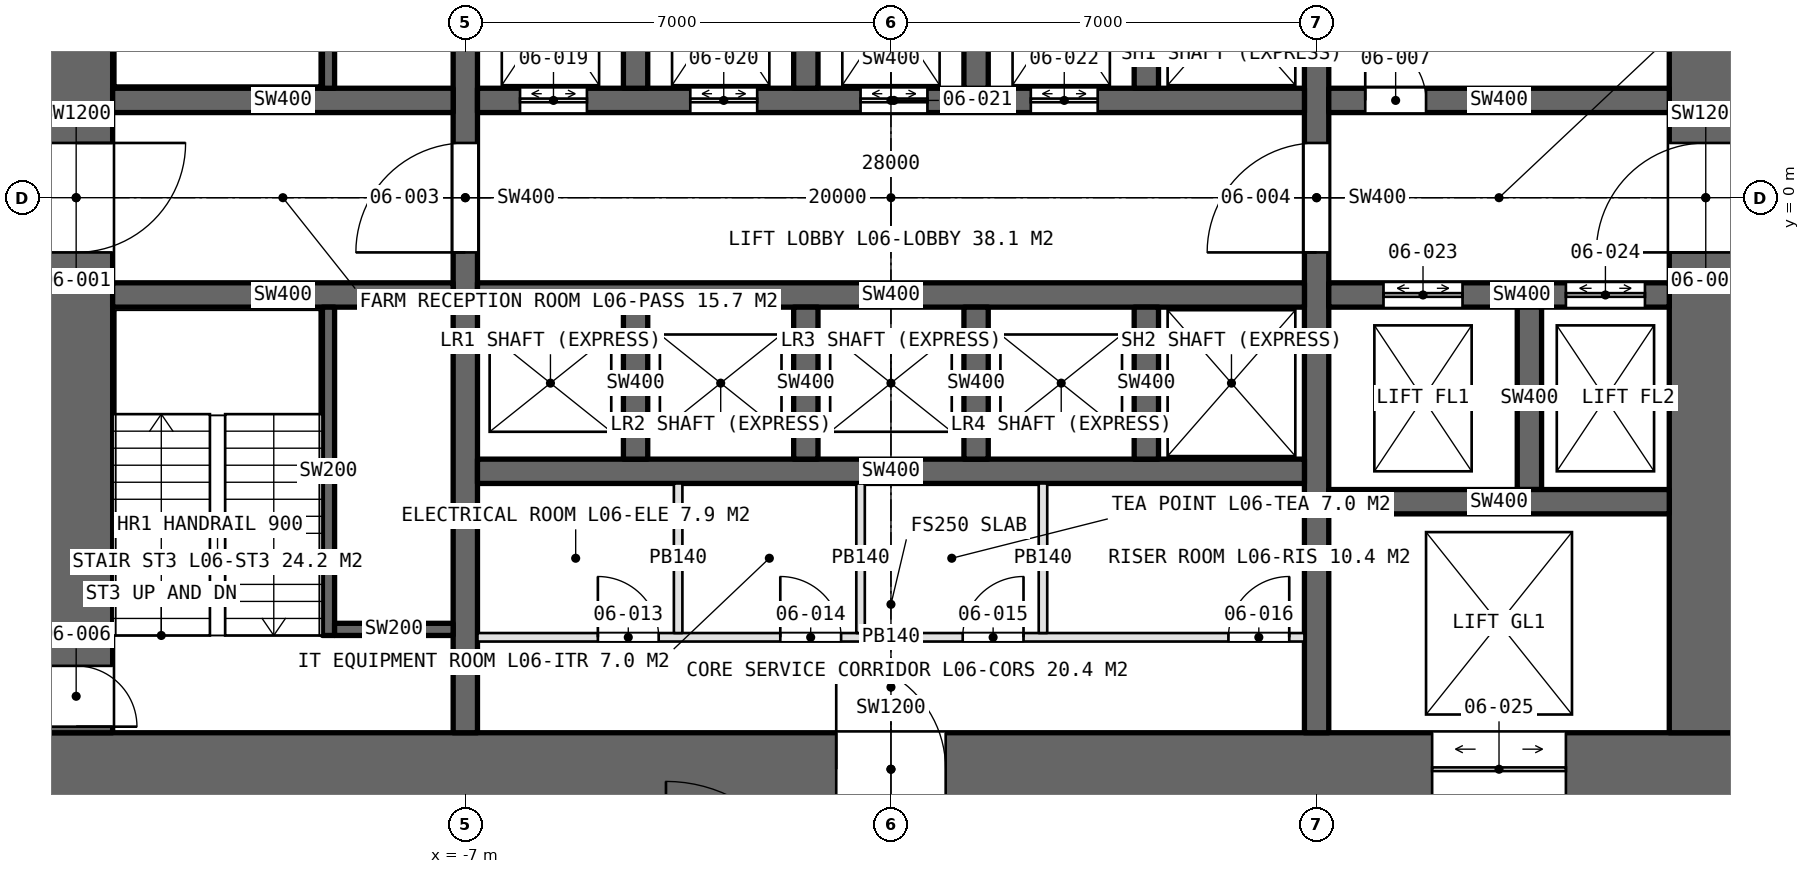
"""IFC4 building model, lengths in metres.
Left out: names, types, materials, properties, quantities, classifications, styles, units other than length and angle.
Written with IfcOpenShell. Run it as: python <this file> out.ifc"""

import sys

from ifc_helpers import new_model, si_unit, direction, frame, frame_2d, origin, place, context, subcontext, project, spatial, rectangle, extrude, element, fill, save


model = new_model("IFC4")
c1 = context("Model", 3, precision=1e-05, world=origin(), true_north=direction((0.0, 1.0)))
c2 = subcontext(c1, "Body", "Model", "MODEL_VIEW")
j1 = project(units=[si_unit("LENGTHUNIT", "METRE"), si_unit("PLANEANGLEUNIT", "RADIAN")], contexts=[c1])
p1 = place(None, origin())
s1 = spatial("IfcSite", under=j1, at=p1, CompositionType="ELEMENT")
p2 = place(p1, origin())
s2 = spatial("IfcBuilding", under=s1, at=p2, CompositionType="ELEMENT")
p3 = place(p2, frame((0.0, 0.0, 30.0)))
s3 = spatial("IfcBuildingStorey", under=s2, at=p3, CompositionType="ELEMENT", Elevation=30.0)
p4 = place(p3, frame((-14.0, -9.4, 0.0), z_axis=(0.0, 0.0, 1.0), x_axis=(1.0, 0.0, 0.0)))
e1 = element("IfcWall", 1, at=p4, inside=s3, PredefinedType="SHEAR", context=c2, shape_type="SweptSolid", body=[
    extrude(rectangle(XDim=28.0, YDim=1.2, at=frame_2d((14.0, 0.0))), origin(), (0.0, 0.0, 1.0), 5.0),
])
p5 = place(p4, frame((13.1, 0.0, 0.0)))
e2 = element("IfcOpeningElement", 2, at=p5, cuts=e1, PredefinedType="OPENING", context=c2, shape_type="SweptSolid", body=[
    extrude(rectangle(XDim=1.8, YDim=2.4, at=frame_2d((0.9, 1.2))), frame((0.0, 0.61, 0.0), z_axis=(0.0, -1.0, 0.0), x_axis=(1.0, 0.0, 0.0)), (0.0, 0.0, 1.0), 1.22),
])
p6 = place(p4, frame((22.9, 0.0, 0.0)))
e3 = element("IfcOpeningElement", 3, at=p6, cuts=e1, PredefinedType="OPENING", context=c2, shape_type="SweptSolid", body=[
    extrude(rectangle(XDim=2.2, YDim=2.7, at=frame_2d((1.1, 1.35))), frame((0.0, 0.61, 0.0), z_axis=(0.0, -1.0, 0.0), x_axis=(1.0, 0.0, 0.0)), (0.0, 0.0, 1.0), 1.22),
])
p7 = place(p3, frame((-13.4, 8.8, 0.0), z_axis=(0.0, 0.0, 1.0), x_axis=(0.0, -1.0, 0.0)))
e4 = element("IfcWall", 4, at=p7, inside=s3, PredefinedType="SHEAR", context=c2, shape_type="SweptSolid", body=[
    extrude(rectangle(XDim=17.6, YDim=1.2, at=frame_2d((8.8, 0.0))), origin(), (0.0, 0.0, 1.0), 5.0),
])
p8 = place(p7, frame((7.9, 0.0, 0.0)))
e5 = element("IfcOpeningElement", 5, at=p8, cuts=e4, PredefinedType="OPENING", context=c2, shape_type="SweptSolid", body=[
    extrude(rectangle(XDim=1.8, YDim=2.4, at=frame_2d((0.9, 1.2))), frame((0.0, 0.61, 0.0), z_axis=(0.0, -1.0, 0.0), x_axis=(1.0, 0.0, 0.0)), (0.0, 0.0, 1.0), 1.22),
])
p9 = place(p7, frame((16.5, 0.0, 0.0)))
e6 = element("IfcOpeningElement", 6, at=p9, cuts=e4, PredefinedType="OPENING", context=c2, shape_type="SweptSolid", body=[
    extrude(rectangle(XDim=1.0, YDim=2.4, at=frame_2d((0.5, 1.2))), frame((0.0, 0.61, 0.0), z_axis=(0.0, -1.0, 0.0), x_axis=(1.0, 0.0, 0.0)), (0.0, 0.0, 1.0), 1.22),
])
p10 = place(p3, frame((13.4, -8.8, 0.0), z_axis=(0.0, 0.0, 1.0), x_axis=(0.0, 1.0, 0.0)))
e7 = element("IfcWall", 7, at=p10, inside=s3, PredefinedType="SHEAR", context=c2, shape_type="SweptSolid", body=[
    extrude(rectangle(XDim=17.6, YDim=1.2, at=frame_2d((8.8, 0.0))), origin(), (0.0, 0.0, 1.0), 5.0),
])
p11 = place(p10, frame((7.9, 0.0, 0.0)))
e8 = element("IfcOpeningElement", 8, at=p11, cuts=e7, PredefinedType="OPENING", context=c2, shape_type="SweptSolid", body=[
    extrude(rectangle(XDim=1.8, YDim=2.4, at=frame_2d((0.9, 1.2))), frame((0.0, 0.61, 0.0), z_axis=(0.0, -1.0, 0.0), x_axis=(1.0, 0.0, 0.0)), (0.0, 0.0, 1.0), 1.22),
])
p12 = place(p3, frame((-7.0, -8.8, 0.0), z_axis=(0.0, 0.0, 1.0), x_axis=(0.0, 1.0, 0.0)))
e9 = element("IfcWall", 9, at=p12, inside=s3, PredefinedType="SHEAR", context=c2, shape_type="SweptSolid", body=[
    extrude(rectangle(XDim=17.6, YDim=0.4, at=frame_2d((8.8, 0.0))), origin(), (0.0, 0.0, 1.0), 5.0),
])
p13 = place(p12, frame((7.9, 0.0, 0.0)))
e10 = element("IfcOpeningElement", 10, at=p13, cuts=e9, PredefinedType="OPENING", context=c2, shape_type="SweptSolid", body=[
    extrude(rectangle(XDim=1.8, YDim=2.4, at=frame_2d((0.9, 1.2))), frame((0.0, 0.21, 0.0), z_axis=(0.0, -1.0, 0.0), x_axis=(1.0, 0.0, 0.0)), (0.0, 0.0, 1.0), 0.42),
])
p14 = place(p3, frame((7.0, -8.8, 0.0), z_axis=(0.0, 0.0, 1.0), x_axis=(0.0, 1.0, 0.0)))
e11 = element("IfcWall", 11, at=p14, inside=s3, PredefinedType="SHEAR", context=c2, shape_type="SweptSolid", body=[
    extrude(rectangle(XDim=17.6, YDim=0.4, at=frame_2d((8.8, 0.0))), origin(), (0.0, 0.0, 1.0), 5.0),
])
p15 = place(p14, frame((7.9, 0.0, 0.0)))
e12 = element("IfcOpeningElement", 12, at=p15, cuts=e11, PredefinedType="OPENING", context=c2, shape_type="SweptSolid", body=[
    extrude(rectangle(XDim=1.8, YDim=2.4, at=frame_2d((0.9, 1.2))), frame((0.0, 0.21, 0.0), z_axis=(0.0, -1.0, 0.0), x_axis=(1.0, 0.0, 0.0)), (0.0, 0.0, 1.0), 0.42),
])
p16 = place(p3, frame((-6.8, 1.6, 0.0), z_axis=(0.0, 0.0, 1.0), x_axis=(1.0, 0.0, 0.0)))
e13 = element("IfcWall", 13, at=p16, inside=s3, PredefinedType="SHEAR", context=c2, shape_type="SweptSolid", body=[
    extrude(rectangle(XDim=13.6, YDim=0.4, at=frame_2d((6.8, 0.0))), origin(), (0.0, 0.0, 1.0), 5.0),
])
p17 = place(p16, frame((0.7, 0.0, 0.0)))
e14 = element("IfcOpeningElement", 14, at=p17, cuts=e13, PredefinedType="OPENING", context=c2, shape_type="SweptSolid", body=[
    extrude(rectangle(XDim=1.1, YDim=2.4, at=frame_2d((0.55, 1.2))), frame((0.0, 0.21, 0.0), z_axis=(0.0, -1.0, 0.0), x_axis=(1.0, 0.0, 0.0)), (0.0, 0.0, 1.0), 0.42),
])
p18 = place(p16, frame((3.5, 0.0, 0.0)))
e15 = element("IfcOpeningElement", 15, at=p18, cuts=e13, PredefinedType="OPENING", context=c2, shape_type="SweptSolid", body=[
    extrude(rectangle(XDim=1.1, YDim=2.4, at=frame_2d((0.55, 1.2))), frame((0.0, 0.21, 0.0), z_axis=(0.0, -1.0, 0.0), x_axis=(1.0, 0.0, 0.0)), (0.0, 0.0, 1.0), 0.42),
])
p19 = place(p16, frame((6.3, 0.0, 0.0)))
e16 = element("IfcOpeningElement", 16, at=p19, cuts=e13, PredefinedType="OPENING", context=c2, shape_type="SweptSolid", body=[
    extrude(rectangle(XDim=1.1, YDim=2.4, at=frame_2d((0.55, 1.2))), frame((0.0, 0.21, 0.0), z_axis=(0.0, -1.0, 0.0), x_axis=(1.0, 0.0, 0.0)), (0.0, 0.0, 1.0), 0.42),
])
p20 = place(p16, frame((9.1, 0.0, 0.0)))
e17 = element("IfcOpeningElement", 17, at=p20, cuts=e13, PredefinedType="OPENING", context=c2, shape_type="SweptSolid", body=[
    extrude(rectangle(XDim=1.1, YDim=2.4, at=frame_2d((0.55, 1.2))), frame((0.0, 0.21, 0.0), z_axis=(0.0, -1.0, 0.0), x_axis=(1.0, 0.0, 0.0)), (0.0, 0.0, 1.0), 0.42),
])
for number, where, z_axis, x_axis in (
    (18, (-6.8, -1.6, 0.0), (0.0, 0.0, 1.0), (1.0, 0.0, 0.0)),
    (19, (-6.8, -4.5, 0.0), (0.0, 0.0, 1.0), (1.0, 0.0, 0.0)),
):
    element("IfcWall", number, at=place(p3, frame(where, z_axis=z_axis, x_axis=x_axis)), inside=s3, PredefinedType="SHEAR", context=c2, shape_type="SweptSolid", body=[
        extrude(rectangle(XDim=13.6, YDim=0.4, at=frame_2d((6.8, 0.0))), origin(), (0.0, 0.0, 1.0), 5.0),
    ])
for number, where, z_axis, x_axis in (
    (20, (-12.8, 1.6, 0.0), (0.0, 0.0, 1.0), (1.0, 0.0, 0.0)),
    (21, (-12.8, -1.6, 0.0), (0.0, 0.0, 1.0), (1.0, 0.0, 0.0)),
):
    element("IfcWall", number, at=place(p3, frame(where, z_axis=z_axis, x_axis=x_axis)), inside=s3, PredefinedType="SHEAR", context=c2, shape_type="SweptSolid", body=[
        extrude(rectangle(XDim=5.6, YDim=0.4, at=frame_2d((2.8, 0.0))), origin(), (0.0, 0.0, 1.0), 5.0),
    ])
p21 = place(p3, frame((7.2, 1.6, 0.0), z_axis=(0.0, 0.0, 1.0), x_axis=(1.0, 0.0, 0.0)))
e22 = element("IfcWall", 22, at=p21, inside=s3, PredefinedType="SHEAR", context=c2, shape_type="SweptSolid", body=[
    extrude(rectangle(XDim=5.6, YDim=0.4, at=frame_2d((2.8, 0.0))), origin(), (0.0, 0.0, 1.0), 5.0),
])
p22 = place(p21, frame((0.6, 0.0, 0.0)))
e23 = element("IfcOpeningElement", 23, at=p22, cuts=e22, PredefinedType="OPENING", context=c2, shape_type="SweptSolid", body=[
    extrude(rectangle(XDim=1.0, YDim=2.4, at=frame_2d((0.5, 1.2))), frame((0.0, 0.21, 0.0), z_axis=(0.0, -1.0, 0.0), x_axis=(1.0, 0.0, 0.0)), (0.0, 0.0, 1.0), 0.42),
])
p23 = place(p3, frame((7.2, -1.6, 0.0), z_axis=(0.0, 0.0, 1.0), x_axis=(1.0, 0.0, 0.0)))
e24 = element("IfcWall", 24, at=p23, inside=s3, PredefinedType="SHEAR", context=c2, shape_type="SweptSolid", body=[
    extrude(rectangle(XDim=5.6, YDim=0.4, at=frame_2d((2.8, 0.0))), origin(), (0.0, 0.0, 1.0), 5.0),
])
p24 = place(p23, frame((0.9, 0.0, 0.0)))
e25 = element("IfcOpeningElement", 25, at=p24, cuts=e24, PredefinedType="OPENING", context=c2, shape_type="SweptSolid", body=[
    extrude(rectangle(XDim=1.3, YDim=2.4, at=frame_2d((0.65, 1.2))), frame((0.0, 0.21, 0.0), z_axis=(0.0, -1.0, 0.0), x_axis=(1.0, 0.0, 0.0)), (0.0, 0.0, 1.0), 0.42),
])
p25 = place(p23, frame((3.9, 0.0, 0.0)))
e26 = element("IfcOpeningElement", 26, at=p25, cuts=e24, PredefinedType="OPENING", context=c2, shape_type="SweptSolid", body=[
    extrude(rectangle(XDim=1.3, YDim=2.4, at=frame_2d((0.65, 1.2))), frame((0.0, 0.21, 0.0), z_axis=(0.0, -1.0, 0.0), x_axis=(1.0, 0.0, 0.0)), (0.0, 0.0, 1.0), 0.42),
])
p26 = place(p3, frame((10.5, -4.8, 0.0), z_axis=(0.0, 0.0, 1.0), x_axis=(0.0, 1.0, 0.0)))
e27 = element("IfcWall", 27, at=p26, inside=s3, PredefinedType="SHEAR", context=c2, shape_type="SweptSolid", body=[
    extrude(rectangle(XDim=3.0, YDim=0.4, at=frame_2d((1.5, 0.0))), origin(), (0.0, 0.0, 1.0), 5.0),
])
p27 = place(p3, frame((7.2, -5.0, 0.0), z_axis=(0.0, 0.0, 1.0), x_axis=(1.0, 0.0, 0.0)))
e28 = element("IfcWall", 28, at=p27, inside=s3, PredefinedType="SHEAR", context=c2, shape_type="SweptSolid", body=[
    extrude(rectangle(XDim=5.6, YDim=0.4, at=frame_2d((2.8, 0.0))), origin(), (0.0, 0.0, 1.0), 5.0),
])
for number, where, z_axis, x_axis in (
    (29, (-4.2, 1.8, 0.0), (0.0, 0.0, 1.0), (0.0, 1.0, 0.0)),
    (30, (-4.2, -4.3, 0.0), (0.0, 0.0, 1.0), (0.0, 1.0, 0.0)),
    (31, (-1.4, 1.8, 0.0), (0.0, 0.0, 1.0), (0.0, 1.0, 0.0)),
    (32, (-1.4, -4.3, 0.0), (0.0, 0.0, 1.0), (0.0, 1.0, 0.0)),
    (33, (1.4, 1.8, 0.0), (0.0, 0.0, 1.0), (0.0, 1.0, 0.0)),
    (34, (1.4, -4.3, 0.0), (0.0, 0.0, 1.0), (0.0, 1.0, 0.0)),
    (35, (4.2, 1.8, 0.0), (0.0, 0.0, 1.0), (0.0, 1.0, 0.0)),
    (36, (4.2, -4.3, 0.0), (0.0, 0.0, 1.0), (0.0, 1.0, 0.0)),
):
    element("IfcWall", number, at=place(p3, frame(where, z_axis=z_axis, x_axis=x_axis)), inside=s3, PredefinedType="SHEAR", context=c2, shape_type="SweptSolid", body=[
        extrude(rectangle(XDim=2.5, YDim=0.4, at=frame_2d((1.25, 0.0))), origin(), (0.0, 0.0, 1.0), 5.0),
    ])
p28 = place(p3, frame((-6.8, -7.23, 0.0), z_axis=(0.0, 0.0, 1.0), x_axis=(1.0, 0.0, 0.0)))
e37 = element("IfcWall", 37, at=p28, inside=s3, PredefinedType="PARTITIONING", context=c2, shape_type="SweptSolid", body=[
    extrude(rectangle(XDim=13.6, YDim=0.14, at=frame_2d((6.8, 0.0))), origin(), (0.0, 0.0, 1.0), 4.75),
])
p29 = place(p28, frame((1.98, 0.0, 0.0)))
e38 = element("IfcOpeningElement", 38, at=p29, cuts=e37, PredefinedType="OPENING", context=c2, shape_type="SweptSolid", body=[
    extrude(rectangle(XDim=1.0, YDim=2.4, at=frame_2d((0.5, 1.2))), frame((0.0, 0.08, 0.0), z_axis=(0.0, -1.0, 0.0), x_axis=(1.0, 0.0, 0.0)), (0.0, 0.0, 1.0), 0.16),
])
p30 = place(p28, frame((4.98, 0.0, 0.0)))
e39 = element("IfcOpeningElement", 39, at=p30, cuts=e37, PredefinedType="OPENING", context=c2, shape_type="SweptSolid", body=[
    extrude(rectangle(XDim=1.0, YDim=2.4, at=frame_2d((0.5, 1.2))), frame((0.0, 0.08, 0.0), z_axis=(0.0, -1.0, 0.0), x_axis=(1.0, 0.0, 0.0)), (0.0, 0.0, 1.0), 0.16),
])
p31 = place(p28, frame((7.98, 0.0, 0.0)))
e40 = element("IfcOpeningElement", 40, at=p31, cuts=e37, PredefinedType="OPENING", context=c2, shape_type="SweptSolid", body=[
    extrude(rectangle(XDim=1.0, YDim=2.4, at=frame_2d((0.5, 1.2))), frame((0.0, 0.08, 0.0), z_axis=(0.0, -1.0, 0.0), x_axis=(1.0, 0.0, 0.0)), (0.0, 0.0, 1.0), 0.16),
])
p32 = place(p28, frame((12.35, 0.0, 0.0)))
e41 = element("IfcOpeningElement", 41, at=p32, cuts=e37, PredefinedType="OPENING", context=c2, shape_type="SweptSolid", body=[
    extrude(rectangle(XDim=1.0, YDim=2.4, at=frame_2d((0.5, 1.2))), frame((0.0, 0.08, 0.0), z_axis=(0.0, -1.0, 0.0), x_axis=(1.0, 0.0, 0.0)), (0.0, 0.0, 1.0), 0.16),
])
for number, where, z_axis, x_axis in (
    (42, (-3.5, -4.7, 0.0), (0.0, 0.0, 1.0), (0.0, -1.0, 0.0)),
    (43, (-0.5, -4.7, 0.0), (0.0, 0.0, 1.0), (0.0, -1.0, 0.0)),
    (44, (2.5, -4.7, 0.0), (0.0, 0.0, 1.0), (0.0, -1.0, 0.0)),
):
    element("IfcWall", number, at=place(p3, frame(where, z_axis=z_axis, x_axis=x_axis)), inside=s3, PredefinedType="PARTITIONING", context=c2, shape_type="SweptSolid", body=[
        extrude(rectangle(XDim=2.46, YDim=0.14, at=frame_2d((1.23, 0.0))), origin(), (0.0, 0.0, 1.0), 4.75),
    ])
for number, where, z_axis, x_axis in (
    (45, (-9.25, 7.2, 0.0), (0.0, 0.0, 1.0), (0.0, -1.0, 0.0)),
    (46, (-9.25, -7.2, 0.0), (0.0, 0.0, 1.0), (0.0, 1.0, 0.0)),
):
    element("IfcWall", number, at=place(p3, frame(where, z_axis=z_axis, x_axis=x_axis)), inside=s3, PredefinedType="SOLIDWALL", context=c2, shape_type="SweptSolid", body=[
        extrude(rectangle(XDim=5.4, YDim=0.2, at=frame_2d((2.7, 0.0))), origin(), (0.0, 0.0, 1.0), 5.0),
    ])
p33 = place(p3, frame((-9.15, -7.1, 0.0), z_axis=(0.0, 0.0, 1.0), x_axis=(1.0, 0.0, 0.0)))
e47 = element("IfcWall", 47, at=p33, inside=s3, PredefinedType="SOLIDWALL", context=c2, shape_type="SweptSolid", body=[
    extrude(rectangle(XDim=1.95, YDim=0.2, at=frame_2d((0.975, 0.0))), origin(), (0.0, 0.0, 1.0), 5.0),
])
p34 = place(p8, origin())
e48 = element("IfcDoor", 48, at=p34, inside=s3, OperationType="DOUBLE_DOOR_SINGLE_SWING", PredefinedType="DOOR", context=c2, shape_type="SweptSolid", body=[
    extrude(rectangle(XDim=1.8, YDim=2.4, at=frame_2d((0.9, 1.2))), frame((0.0, 0.025, 0.0), z_axis=(0.0, -1.0, 0.0), x_axis=(1.0, 0.0, 0.0)), (0.0, 0.0, 1.0), 0.05),
])
fill(e5, e48)
p35 = place(p11, origin())
e49 = element("IfcDoor", 49, at=p35, inside=s3, OperationType="DOUBLE_DOOR_SINGLE_SWING", PredefinedType="DOOR", context=c2, shape_type="SweptSolid", body=[
    extrude(rectangle(XDim=1.8, YDim=2.4, at=frame_2d((0.9, 1.2))), frame((0.0, 0.025, 0.0), z_axis=(0.0, -1.0, 0.0), x_axis=(1.0, 0.0, 0.0)), (0.0, 0.0, 1.0), 0.05),
])
fill(e8, e49)
p36 = place(p13, origin())
e50 = element("IfcDoor", 50, at=p36, inside=s3, OperationType="DOUBLE_DOOR_SINGLE_SWING", PredefinedType="DOOR", context=c2, shape_type="SweptSolid", body=[
    extrude(rectangle(XDim=1.8, YDim=2.4, at=frame_2d((0.9, 1.2))), frame((0.0, 0.025, 0.0), z_axis=(0.0, -1.0, 0.0), x_axis=(1.0, 0.0, 0.0)), (0.0, 0.0, 1.0), 0.05),
])
fill(e10, e50)
p37 = place(p15, origin())
e51 = element("IfcDoor", 51, at=p37, inside=s3, OperationType="DOUBLE_DOOR_SINGLE_SWING", PredefinedType="DOOR", context=c2, shape_type="SweptSolid", body=[
    extrude(rectangle(XDim=1.8, YDim=2.4, at=frame_2d((0.9, 1.2))), frame((0.0, 0.025, 0.0), z_axis=(0.0, -1.0, 0.0), x_axis=(1.0, 0.0, 0.0)), (0.0, 0.0, 1.0), 0.05),
])
fill(e12, e51)
p38 = place(p9, origin())
e52 = element("IfcDoor", 52, at=p38, inside=s3, OperationType="SINGLE_SWING_RIGHT", PredefinedType="DOOR", context=c2, shape_type="SweptSolid", body=[
    extrude(rectangle(XDim=1.0, YDim=2.4, at=frame_2d((0.5, 1.2))), frame((0.0, 0.025, 0.0), z_axis=(0.0, -1.0, 0.0), x_axis=(1.0, 0.0, 0.0)), (0.0, 0.0, 1.0), 0.05),
])
fill(e6, e52)
p39 = place(p22, origin())
e53 = element("IfcDoor", 53, at=p39, inside=s3, OperationType="SINGLE_SWING_LEFT", PredefinedType="DOOR", context=c2, shape_type="SweptSolid", body=[
    extrude(rectangle(XDim=1.0, YDim=2.4, at=frame_2d((0.5, 1.2))), frame((0.0, 0.025, 0.0), z_axis=(0.0, -1.0, 0.0), x_axis=(1.0, 0.0, 0.0)), (0.0, 0.0, 1.0), 0.05),
])
fill(e23, e53)
p40 = place(p29, origin())
e54 = element("IfcDoor", 54, at=p40, inside=s3, OperationType="SINGLE_SWING_LEFT", PredefinedType="DOOR", context=c2, shape_type="SweptSolid", body=[
    extrude(rectangle(XDim=1.0, YDim=2.4, at=frame_2d((0.5, 1.2))), frame((0.0, 0.025, 0.0), z_axis=(0.0, -1.0, 0.0), x_axis=(1.0, 0.0, 0.0)), (0.0, 0.0, 1.0), 0.05),
])
fill(e38, e54)
p41 = place(p30, origin())
e55 = element("IfcDoor", 55, at=p41, inside=s3, OperationType="SINGLE_SWING_LEFT", PredefinedType="DOOR", context=c2, shape_type="SweptSolid", body=[
    extrude(rectangle(XDim=1.0, YDim=2.4, at=frame_2d((0.5, 1.2))), frame((0.0, 0.025, 0.0), z_axis=(0.0, -1.0, 0.0), x_axis=(1.0, 0.0, 0.0)), (0.0, 0.0, 1.0), 0.05),
])
fill(e39, e55)
p42 = place(p31, origin())
e56 = element("IfcDoor", 56, at=p42, inside=s3, OperationType="SINGLE_SWING_RIGHT", PredefinedType="DOOR", context=c2, shape_type="SweptSolid", body=[
    extrude(rectangle(XDim=1.0, YDim=2.4, at=frame_2d((0.5, 1.2))), frame((0.0, 0.025, 0.0), z_axis=(0.0, -1.0, 0.0), x_axis=(1.0, 0.0, 0.0)), (0.0, 0.0, 1.0), 0.05),
])
fill(e40, e56)
p43 = place(p32, origin())
e57 = element("IfcDoor", 57, at=p43, inside=s3, OperationType="SINGLE_SWING_RIGHT", PredefinedType="DOOR", context=c2, shape_type="SweptSolid", body=[
    extrude(rectangle(XDim=1.0, YDim=2.4, at=frame_2d((0.5, 1.2))), frame((0.0, 0.025, 0.0), z_axis=(0.0, -1.0, 0.0), x_axis=(1.0, 0.0, 0.0)), (0.0, 0.0, 1.0), 0.05),
])
fill(e41, e57)
p44 = place(p5, origin())
e58 = element("IfcDoor", 58, at=p44, inside=s3, OperationType="DOUBLE_DOOR_SINGLE_SWING", PredefinedType="DOOR", context=c2, shape_type="SweptSolid", body=[
    extrude(rectangle(XDim=1.8, YDim=2.4, at=frame_2d((0.9, 1.2))), frame((0.0, 0.025, 0.0), z_axis=(0.0, -1.0, 0.0), x_axis=(1.0, 0.0, 0.0)), (0.0, 0.0, 1.0), 0.05),
])
fill(e2, e58)
p45 = place(p17, origin())
e59 = element("IfcDoor", 59, at=p45, inside=s3, OperationType="DOUBLE_DOOR_SLIDING", PredefinedType="DOOR", context=c2, shape_type="SweptSolid", body=[
    extrude(rectangle(XDim=1.1, YDim=2.4, at=frame_2d((0.55, 1.2))), frame((0.0, 0.025, 0.0), z_axis=(0.0, -1.0, 0.0), x_axis=(1.0, 0.0, 0.0)), (0.0, 0.0, 1.0), 0.05),
])
fill(e14, e59)
p46 = place(p18, origin())
e60 = element("IfcDoor", 60, at=p46, inside=s3, OperationType="DOUBLE_DOOR_SLIDING", PredefinedType="DOOR", context=c2, shape_type="SweptSolid", body=[
    extrude(rectangle(XDim=1.1, YDim=2.4, at=frame_2d((0.55, 1.2))), frame((0.0, 0.025, 0.0), z_axis=(0.0, -1.0, 0.0), x_axis=(1.0, 0.0, 0.0)), (0.0, 0.0, 1.0), 0.05),
])
fill(e15, e60)
p47 = place(p19, origin())
e61 = element("IfcDoor", 61, at=p47, inside=s3, OperationType="DOUBLE_DOOR_SLIDING", PredefinedType="DOOR", context=c2, shape_type="SweptSolid", body=[
    extrude(rectangle(XDim=1.1, YDim=2.4, at=frame_2d((0.55, 1.2))), frame((0.0, 0.025, 0.0), z_axis=(0.0, -1.0, 0.0), x_axis=(1.0, 0.0, 0.0)), (0.0, 0.0, 1.0), 0.05),
])
fill(e16, e61)
p48 = place(p20, origin())
e62 = element("IfcDoor", 62, at=p48, inside=s3, OperationType="DOUBLE_DOOR_SLIDING", PredefinedType="DOOR", context=c2, shape_type="SweptSolid", body=[
    extrude(rectangle(XDim=1.1, YDim=2.4, at=frame_2d((0.55, 1.2))), frame((0.0, 0.025, 0.0), z_axis=(0.0, -1.0, 0.0), x_axis=(1.0, 0.0, 0.0)), (0.0, 0.0, 1.0), 0.05),
])
fill(e17, e62)
p49 = place(p24, origin())
e63 = element("IfcDoor", 63, at=p49, inside=s3, OperationType="DOUBLE_DOOR_SLIDING", PredefinedType="DOOR", context=c2, shape_type="SweptSolid", body=[
    extrude(rectangle(XDim=1.3, YDim=2.4, at=frame_2d((0.65, 1.2))), frame((0.0, 0.025, 0.0), z_axis=(0.0, -1.0, 0.0), x_axis=(1.0, 0.0, 0.0)), (0.0, 0.0, 1.0), 0.05),
])
fill(e25, e63)
p50 = place(p25, origin())
e64 = element("IfcDoor", 64, at=p50, inside=s3, OperationType="DOUBLE_DOOR_SLIDING", PredefinedType="DOOR", context=c2, shape_type="SweptSolid", body=[
    extrude(rectangle(XDim=1.3, YDim=2.4, at=frame_2d((0.65, 1.2))), frame((0.0, 0.025, 0.0), z_axis=(0.0, -1.0, 0.0), x_axis=(1.0, 0.0, 0.0)), (0.0, 0.0, 1.0), 0.05),
])
fill(e26, e64)
p51 = place(p6, origin())
e65 = element("IfcDoor", 65, at=p51, inside=s3, OperationType="DOUBLE_DOOR_SLIDING", PredefinedType="DOOR", context=c2, shape_type="SweptSolid", body=[
    extrude(rectangle(XDim=2.2, YDim=2.7, at=frame_2d((1.1, 1.35))), frame((0.0, 0.025, 0.0), z_axis=(0.0, -1.0, 0.0), x_axis=(1.0, 0.0, 0.0)), (0.0, 0.0, 1.0), 0.05),
])
fill(e3, e65)
save(model, sys.argv[1])
